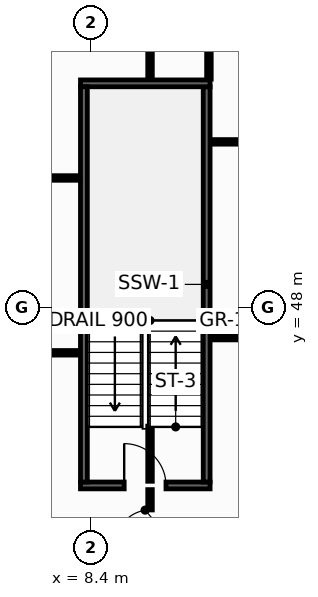
"""IFC4 building model, lengths in metres.
Left out: names, types, materials, properties, quantities, classifications, styles, units other than length and angle.
Written with IfcOpenShell. Run it as: python <this file> out.ifc"""

import sys

from ifc_helpers import new_model, si_unit, direction, frame, frame_2d, origin, place, context, subcontext, project, spatial, rectangle, extrude, element, fill, save


model = new_model("IFC4")
c1 = context("Model", 3, precision=1e-05, world=origin(), true_north=direction((0.0, 1.0)))
c2 = subcontext(c1, "Body", "Model", "MODEL_VIEW")
j1 = project(units=[si_unit("LENGTHUNIT", "METRE"), si_unit("PLANEANGLEUNIT", "RADIAN")], contexts=[c1])
p1 = place(None, origin())
s1 = spatial("IfcSite", under=j1, at=p1, CompositionType="ELEMENT")
p2 = place(p1, origin())
s2 = spatial("IfcBuilding", under=s1, at=p2, CompositionType="ELEMENT")
p3 = place(p2, frame((0.0, 0.0, 242.0)))
s3 = spatial("IfcBuildingStorey", under=s2, at=p3, CompositionType="ELEMENT", Elevation=242.0)
p4 = place(p3, frame((8.12, 43.31, 0.0), z_axis=(0.0, 0.0, 1.0), x_axis=(1.0, 0.0, 0.0)))
e1 = element("IfcWall", 1, at=p4, inside=s3, PredefinedType="SHEAR", context=c2, shape_type="SweptSolid", body=[
    extrude(rectangle(XDim=3.41, YDim=0.18, at=frame_2d((1.705, 0.0))), origin(), (0.0, 0.0, 1.0), 3.55),
])
p5 = place(p4, frame((1.15, 0.0, 0.0)))
e2 = element("IfcOpeningElement", 2, at=p5, cuts=e1, PredefinedType="OPENING", context=c2, shape_type="SweptSolid", body=[
    extrude(rectangle(XDim=1.1, YDim=2.15, at=frame_2d((0.55, 1.075))), frame((0.0, 0.1, 0.0), z_axis=(0.0, -1.0, 0.0), x_axis=(1.0, 0.0, 0.0)), (0.0, 0.0, 1.0), 0.2),
])
p6 = place(p3, frame((11.44, 43.4, 0.0), z_axis=(0.0, 0.0, 1.0), x_axis=(0.0, 1.0, 0.0)))
e3 = element("IfcWall", 3, at=p6, inside=s3, PredefinedType="SHEAR", context=c2, shape_type="SweptSolid", body=[
    extrude(rectangle(XDim=10.4, YDim=0.18, at=frame_2d((5.2, 0.0))), origin(), (0.0, 0.0, 1.0), 3.55),
])
p7 = place(p3, frame((11.53, 53.89, 0.0), z_axis=(0.0, 0.0, 1.0), x_axis=(-1.0, 0.0, 0.0)))
e4 = element("IfcWall", 4, at=p7, inside=s3, PredefinedType="SHEAR", context=c2, shape_type="SweptSolid", body=[
    extrude(rectangle(XDim=3.41, YDim=0.18, at=frame_2d((1.705, 0.0))), origin(), (0.0, 0.0, 1.0), 3.55),
])
p8 = place(p3, frame((8.21, 53.8, 0.0), z_axis=(0.0, 0.0, 1.0), x_axis=(0.0, -1.0, 0.0)))
e5 = element("IfcWall", 5, at=p8, inside=s3, PredefinedType="SHEAR", context=c2, shape_type="SweptSolid", body=[
    extrude(rectangle(XDim=10.4, YDim=0.18, at=frame_2d((5.2, 0.0))), origin(), (0.0, 0.0, 1.0), 3.55),
])
p9 = place(p3, frame((11.55, 52.35, 0.0), z_axis=(0.0, 0.0, 1.0), x_axis=(1.0, 0.0, 0.0)))
e6 = element("IfcWall", 6, at=p9, inside=s3, PredefinedType="PARTITIONING", context=c2, shape_type="SweptSolid", body=[
    extrude(rectangle(XDim=2.13, YDim=0.12, at=frame_2d((1.065, 0.0))), origin(), (0.0, 0.0, 1.0), 3.55),
])
p10 = place(p3, frame((11.5, 54.0, 0.0), z_axis=(0.0, 0.0, 1.0), x_axis=(0.0, 1.0, 0.0)))
e7 = element("IfcWall", 7, at=p10, inside=s3, PredefinedType="PARTITIONING", context=c2, shape_type="SweptSolid", body=[
    extrude(rectangle(XDim=1.995, YDim=0.12, at=frame_2d((0.998, 0.0))), origin(), (0.0, 0.0, 1.0), 2.935),
])
p11 = place(p3, frame((5.045, 46.8, 0.0), z_axis=(0.0, 0.0, 1.0), x_axis=(1.0, 0.0, 0.0)))
e8 = element("IfcWall", 8, at=p11, inside=s3, PredefinedType="PARTITIONING", context=c2, shape_type="SweptSolid", body=[
    extrude(rectangle(XDim=3.055, YDim=0.12, at=frame_2d((1.527, 0.0))), origin(), (0.0, 0.0, 1.0), 2.947),
])
p12 = place(p3, frame((4.248, 51.4, 0.0), z_axis=(0.0, 0.0, 1.0), x_axis=(1.0, 0.0, 0.0)))
e9 = element("IfcWall", 9, at=p12, inside=s3, PredefinedType="PARTITIONING", context=c2, shape_type="SweptSolid", body=[
    extrude(rectangle(XDim=3.852, YDim=0.12, at=frame_2d((1.926, 0.0))), origin(), (0.0, 0.0, 1.0), 2.947),
])
p13 = place(p3, frame((9.95, 41.23, 0.0), z_axis=(0.0, 0.0, 1.0), x_axis=(0.0, 1.0, 0.0)))
e10 = element("IfcWall", 10, at=p13, inside=s3, PredefinedType="PARTITIONING", context=c2, shape_type="SweptSolid", body=[
    extrude(rectangle(XDim=1.97, YDim=0.12, at=frame_2d((0.985, 0.0))), origin(), (0.0, 0.0, 1.0), 2.947),
])
p14 = place(p13, frame((0.535, 0.0, 0.0)))
e11 = element("IfcOpeningElement", 11, at=p14, cuts=e10, PredefinedType="OPENING", context=c2, shape_type="SweptSolid", body=[
    extrude(rectangle(XDim=0.9, YDim=2.1, at=frame_2d((0.45, 1.05))), frame((0.0, 0.07, 0.0), z_axis=(0.0, -1.0, 0.0), x_axis=(1.0, 0.0, 0.0)), (0.0, 0.0, 1.0), 0.14),
])
p15 = place(p3, frame((9.95, 43.42, 0.0), z_axis=(0.0, 0.0, 1.0), x_axis=(0.0, 1.0, 0.0)))
e12 = element("IfcWall", 12, at=p15, inside=s3, PredefinedType="PARTITIONING", context=c2, shape_type="SweptSolid", body=[
    extrude(rectangle(XDim=1.45, YDim=0.12, at=frame_2d((0.725, 0.0))), origin(), (0.0, 0.0, 1.0), 3.55),
])
p16 = place(p3, frame((9.95, 54.0, 0.0), z_axis=(0.0, 0.0, 1.0), x_axis=(0.0, 1.0, 0.0)))
e13 = element("IfcWall", 13, at=p16, inside=s3, PredefinedType="PARTITIONING", context=c2, shape_type="SweptSolid", body=[
    extrude(rectangle(XDim=1.995, YDim=0.12, at=frame_2d((0.998, 0.0))), origin(), (0.0, 0.0, 1.0), 2.935),
])
p17 = place(p3, frame((11.55, 47.2, 0.0), z_axis=(0.0, 0.0, 1.0), x_axis=(1.0, 0.0, 0.0)))
e14 = element("IfcWall", 14, at=p17, inside=s3, PredefinedType="PARTITIONING", context=c2, shape_type="SweptSolid", body=[
    extrude(rectangle(XDim=2.13, YDim=0.12, at=frame_2d((1.065, 0.0))), origin(), (0.0, 0.0, 1.0), 3.55),
])
p18 = place(p5, origin())
e15 = element("IfcDoor", 15, at=p18, inside=s3, OperationType="SINGLE_SWING_LEFT", PredefinedType="DOOR", context=c2, shape_type="SweptSolid", body=[
    extrude(rectangle(XDim=1.1, YDim=2.15, at=frame_2d((0.55, 1.075))), frame((0.0, 0.025, 0.0), z_axis=(0.0, -1.0, 0.0), x_axis=(1.0, 0.0, 0.0)), (0.0, 0.0, 1.0), 0.05),
])
fill(e2, e15)
p19 = place(p14, origin())
e16 = element("IfcDoor", 16, at=p19, inside=s3, OperationType="SINGLE_SWING_LEFT", PredefinedType="DOOR", context=c2, shape_type="SweptSolid", body=[
    extrude(rectangle(XDim=0.9, YDim=2.1, at=frame_2d((0.45, 1.05))), frame((0.0, 0.025, 0.0), z_axis=(0.0, -1.0, 0.0), x_axis=(1.0, 0.0, 0.0)), (0.0, 0.0, 1.0), 0.05),
])
fill(e11, e16)
save(model, sys.argv[1])
